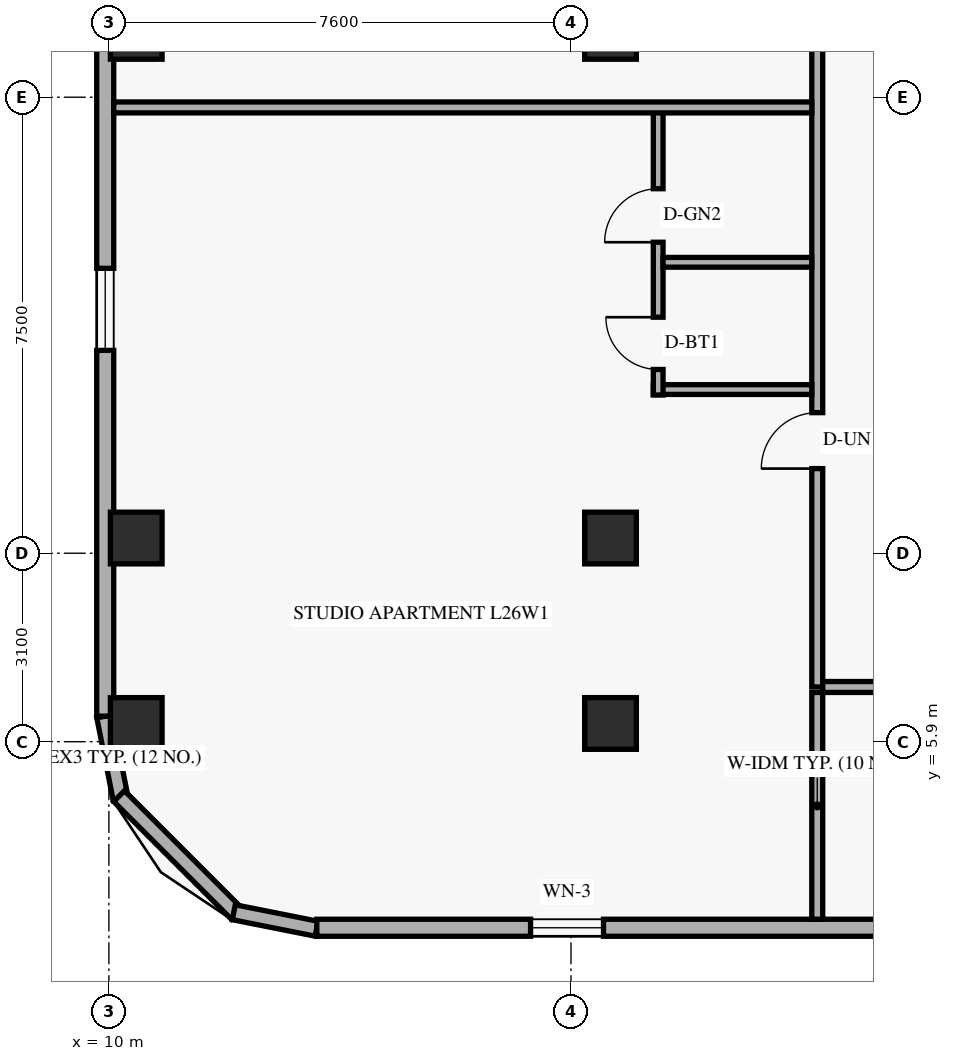
"""IFC4 building model, lengths in metres.
Left out: names, types, materials, properties, quantities, classifications, styles, units other than length and angle.
Written with IfcOpenShell. Run it as: python <this file> out.ifc"""

import sys

from ifc_helpers import new_model, si_unit, direction, frame, frame_2d, origin, origin_2d, place, context, subcontext, project, spatial, rectangle, extrude, element, fill, save


model = new_model("IFC4")
c1 = context("Model", 3, precision=1e-05, world=origin(), true_north=direction((0.0, 1.0)))
c2 = subcontext(c1, "Body", "Model", "MODEL_VIEW")
j1 = project(units=[si_unit("LENGTHUNIT", "METRE"), si_unit("PLANEANGLEUNIT", "RADIAN")], contexts=[c1])
p1 = place(None, origin())
s1 = spatial("IfcSite", under=j1, at=p1, CompositionType="ELEMENT")
p2 = place(p1, origin())
s2 = spatial("IfcBuilding", under=s1, at=p2, CompositionType="ELEMENT")
p3 = place(p2, frame((0.0, 0.0, 102.6)))
s3 = spatial("IfcBuildingStorey", under=s2, at=p3, CompositionType="ELEMENT", Elevation=102.6)
for number, where, z_axis, x_axis in (
    (1, (10.45, 6.2, 0.0), (0.0, 0.0, 1.0), (1.0, 0.0, 0.0)),
    (2, (10.45, 9.25, 0.0), (0.0, 0.0, 1.0), (1.0, 0.0, 0.0)),
    (3, (10.45, 17.55, 0.0), (0.0, 0.0, 1.0), (1.0, 0.0, 0.0)),
    (4, (18.25, 6.2, 0.0), (0.0, 0.0, 1.0), (1.0, 0.0, 0.0)),
    (5, (18.25, 9.25, 0.0), (0.0, 0.0, 1.0), (1.0, 0.0, 0.0)),
    (6, (18.25, 17.55, 0.0), (0.0, 0.0, 1.0), (1.0, 0.0, 0.0)),
):
    element("IfcColumn", number, at=place(p3, frame(where, z_axis=z_axis, x_axis=x_axis)), inside=s3, PredefinedType="COLUMN", context=c2, shape_type="SweptSolid", body=[
        extrude(rectangle(XDim=0.85, YDim=0.85, at=origin_2d()), origin(), (0.0, 0.0, 1.0), 3.6),
    ])
p4 = place(p3, frame((9.924, 6.316, 0.0), z_axis=(0.0, 0.0, 1.0), x_axis=(0.195000137217, -0.980803214965, 0.0)))
e7 = element("IfcWall", 7, at=p4, inside=s3, PredefinedType="SOLIDWALL", context=c2, shape_type="SweptSolid", body=[
    extrude(rectangle(XDim=1.388, YDim=0.25, at=frame_2d((0.694, 0.0))), origin(), (0.0, 0.0, 1.0), 3.36),
])
p5 = place(p3, frame((10.168, 5.005, 0.0), z_axis=(0.0, 0.0, 1.0), x_axis=(0.707151344399, -0.707062215165, 0.0)))
e8 = element("IfcWall", 8, at=p5, inside=s3, PredefinedType="SOLIDWALL", context=c2, shape_type="SweptSolid", body=[
    extrude(rectangle(XDim=2.739, YDim=0.25, at=frame_2d((1.37, 0.0))), origin(), (0.0, 0.0, 1.0), 3.36),
])
p6 = place(p3, frame((12.054, 3.095, 0.0), z_axis=(0.0, 0.0, 1.0), x_axis=(0.980809899341, -0.19496651342, 0.0)))
e9 = element("IfcWall", 9, at=p6, inside=s3, PredefinedType="SOLIDWALL", context=c2, shape_type="SweptSolid", body=[
    extrude(rectangle(XDim=1.389, YDim=0.25, at=frame_2d((0.694, 0.0))), origin(), (0.0, 0.0, 1.0), 3.36),
])
p7 = place(p3, frame((13.42, 2.84, 0.0), z_axis=(0.0, 0.0, 1.0), x_axis=(1.0, 0.0, 0.0)))
e10 = element("IfcWall", 10, at=p7, inside=s3, PredefinedType="SOLIDWALL", context=c2, shape_type="SweptSolid", body=[
    extrude(rectangle(XDim=36.56, YDim=0.28, at=frame_2d((18.28, 0.0))), origin(), (0.0, 0.0, 1.0), 3.36),
])
p8 = place(p7, frame((3.515, 0.0, 0.85)))
e11 = element("IfcOpeningElement", 11, at=p8, cuts=e10, PredefinedType="OPENING", context=c2, shape_type="SweptSolid", body=[
    extrude(rectangle(XDim=1.2, YDim=1.5, at=frame_2d((0.6, 0.75))), frame((0.0, 0.15, 0.0), z_axis=(0.0, -1.0, 0.0), x_axis=(1.0, 0.0, 0.0)), (0.0, 0.0, 1.0), 0.3),
])
p9 = place(p7, frame((10.005, 0.0, 0.85)))
e12 = element("IfcOpeningElement", 12, at=p9, cuts=e10, PredefinedType="OPENING", context=c2, shape_type="SweptSolid", body=[
    extrude(rectangle(XDim=1.2, YDim=1.5, at=frame_2d((0.6, 0.75))), frame((0.0, 0.15, 0.0), z_axis=(0.0, -1.0, 0.0), x_axis=(1.0, 0.0, 0.0)), (0.0, 0.0, 1.0), 0.3),
])
p10 = place(p7, frame((16.89, 0.0, 0.85)))
e13 = element("IfcOpeningElement", 13, at=p10, cuts=e10, PredefinedType="OPENING", context=c2, shape_type="SweptSolid", body=[
    extrude(rectangle(XDim=1.2, YDim=1.5, at=frame_2d((0.6, 0.75))), frame((0.0, 0.15, 0.0), z_axis=(0.0, -1.0, 0.0), x_axis=(1.0, 0.0, 0.0)), (0.0, 0.0, 1.0), 0.3),
])
p11 = place(p7, frame((24.495, 0.0, 0.85)))
e14 = element("IfcOpeningElement", 14, at=p11, cuts=e10, PredefinedType="OPENING", context=c2, shape_type="SweptSolid", body=[
    extrude(rectangle(XDim=1.2, YDim=1.5, at=frame_2d((0.6, 0.75))), frame((0.0, 0.15, 0.0), z_axis=(0.0, -1.0, 0.0), x_axis=(1.0, 0.0, 0.0)), (0.0, 0.0, 1.0), 0.3),
])
p12 = place(p7, frame((30.085, 0.0, 0.85)))
e15 = element("IfcOpeningElement", 15, at=p12, cuts=e10, PredefinedType="OPENING", context=c2, shape_type="SweptSolid", body=[
    extrude(rectangle(XDim=1.2, YDim=1.5, at=frame_2d((0.6, 0.75))), frame((0.0, 0.15, 0.0), z_axis=(0.0, -1.0, 0.0), x_axis=(1.0, 0.0, 0.0)), (0.0, 0.0, 1.0), 0.3),
])
p13 = place(p7, frame((34.27, 0.0, 0.85)))
e16 = element("IfcOpeningElement", 16, at=p13, cuts=e10, PredefinedType="OPENING", context=c2, shape_type="SweptSolid", body=[
    extrude(rectangle(XDim=1.2, YDim=1.5, at=frame_2d((0.6, 0.75))), frame((0.0, 0.15, 0.0), z_axis=(0.0, -1.0, 0.0), x_axis=(1.0, 0.0, 0.0)), (0.0, 0.0, 1.0), 0.3),
])
p14 = place(p3, frame((9.94, 41.68, 0.0), z_axis=(0.0, 0.0, 1.0), x_axis=(0.0, -1.0, 0.0)))
e17 = element("IfcWall", 17, at=p14, inside=s3, PredefinedType="SOLIDWALL", context=c2, shape_type="SweptSolid", body=[
    extrude(rectangle(XDim=35.36, YDim=0.28, at=frame_2d((17.68, 0.0))), origin(), (0.0, 0.0, 1.0), 3.36),
])
p15 = place(p14, frame((27.994, 0.0, 0.85)))
e18 = element("IfcOpeningElement", 18, at=p15, cuts=e17, PredefinedType="OPENING", context=c2, shape_type="SweptSolid", body=[
    extrude(rectangle(XDim=1.35, YDim=1.55, at=frame_2d((0.675, 0.775))), frame((0.0, 0.15, 0.0), z_axis=(0.0, -1.0, 0.0), x_axis=(1.0, 0.0, 0.0)), (0.0, 0.0, 1.0), 0.3),
])
p16 = place(p14, frame((22.018, 0.0, 0.85)))
e19 = element("IfcOpeningElement", 19, at=p16, cuts=e17, PredefinedType="OPENING", context=c2, shape_type="SweptSolid", body=[
    extrude(rectangle(XDim=1.35, YDim=1.55, at=frame_2d((0.675, 0.775))), frame((0.0, 0.15, 0.0), z_axis=(0.0, -1.0, 0.0), x_axis=(1.0, 0.0, 0.0)), (0.0, 0.0, 1.0), 0.3),
])
p17 = place(p14, frame((17.6, 0.0, 0.85)))
e20 = element("IfcOpeningElement", 20, at=p17, cuts=e17, PredefinedType="OPENING", context=c2, shape_type="SweptSolid", body=[
    extrude(rectangle(XDim=1.35, YDim=1.55, at=frame_2d((0.675, 0.775))), frame((0.0, 0.15, 0.0), z_axis=(0.0, -1.0, 0.0), x_axis=(1.0, 0.0, 0.0)), (0.0, 0.0, 1.0), 0.3),
])
p18 = place(p14, frame((12.712, 0.0, 0.85)))
e21 = element("IfcOpeningElement", 21, at=p18, cuts=e17, PredefinedType="OPENING", context=c2, shape_type="SweptSolid", body=[
    extrude(rectangle(XDim=1.35, YDim=1.55, at=frame_2d((0.675, 0.775))), frame((0.0, 0.15, 0.0), z_axis=(0.0, -1.0, 0.0), x_axis=(1.0, 0.0, 0.0)), (0.0, 0.0, 1.0), 0.3),
])
p19 = place(p14, frame((8.841, 0.0, 0.85)))
e22 = element("IfcOpeningElement", 22, at=p19, cuts=e17, PredefinedType="OPENING", context=c2, shape_type="SweptSolid", body=[
    extrude(rectangle(XDim=1.35, YDim=1.55, at=frame_2d((0.675, 0.775))), frame((0.0, 0.15, 0.0), z_axis=(0.0, -1.0, 0.0), x_axis=(1.0, 0.0, 0.0)), (0.0, 0.0, 1.0), 0.3),
])
p20 = place(p14, frame((5.094, 0.0, 0.85)))
e23 = element("IfcOpeningElement", 23, at=p20, cuts=e17, PredefinedType="OPENING", context=c2, shape_type="SweptSolid", body=[
    extrude(rectangle(XDim=1.35, YDim=1.55, at=frame_2d((0.675, 0.775))), frame((0.0, 0.15, 0.0), z_axis=(0.0, -1.0, 0.0), x_axis=(1.0, 0.0, 0.0)), (0.0, 0.0, 1.0), 0.3),
])
p21 = place(p3, frame((21.65, 6.8, 0.0), z_axis=(0.0, 0.0, 1.0), x_axis=(0.0, 1.0, 0.0)))
e24 = element("IfcWall", 24, at=p21, inside=s3, PredefinedType="STANDARD", context=c2, shape_type="SweptSolid", body=[
    extrude(rectangle(XDim=34.4, YDim=0.18, at=frame_2d((17.2, 0.0))), origin(), (0.0, 0.0, 1.0), 2.731),
])
p22 = place(p21, frame((3.592, 0.0, 0.0)))
e25 = element("IfcOpeningElement", 25, at=p22, cuts=e24, PredefinedType="OPENING", context=c2, shape_type="SweptSolid", body=[
    extrude(rectangle(XDim=0.92, YDim=2.15, at=frame_2d((0.46, 1.075))), frame((0.0, 0.1, 0.0), z_axis=(0.0, -1.0, 0.0), x_axis=(1.0, 0.0, 0.0)), (0.0, 0.0, 1.0), 0.2),
])
p23 = place(p21, frame((14.019, 0.0, 0.0)))
e26 = element("IfcOpeningElement", 26, at=p23, cuts=e24, PredefinedType="OPENING", context=c2, shape_type="SweptSolid", body=[
    extrude(rectangle(XDim=0.92, YDim=2.15, at=frame_2d((0.46, 1.075))), frame((0.0, 0.1, 0.0), z_axis=(0.0, -1.0, 0.0), x_axis=(1.0, 0.0, 0.0)), (0.0, 0.0, 1.0), 0.2),
])
p24 = place(p21, frame((28.675, 0.0, 0.0)))
e27 = element("IfcOpeningElement", 27, at=p24, cuts=e24, PredefinedType="OPENING", context=c2, shape_type="SweptSolid", body=[
    extrude(rectangle(XDim=0.92, YDim=2.15, at=frame_2d((0.46, 1.075))), frame((0.0, 0.1, 0.0), z_axis=(0.0, -1.0, 0.0), x_axis=(1.0, 0.0, 0.0)), (0.0, 0.0, 1.0), 0.2),
])
p25 = place(p3, frame((21.74, 6.8, 0.0), z_axis=(0.0, 0.0, 1.0), x_axis=(1.0, 0.0, 0.0)))
e28 = element("IfcWall", 28, at=p25, inside=s3, PredefinedType="STANDARD", context=c2, shape_type="SweptSolid", body=[
    extrude(rectangle(XDim=13.68, YDim=0.18, at=frame_2d((6.84, 0.0))), origin(), (0.0, 0.0, 1.0), 2.731),
])
p26 = place(p25, frame((0.97, 0.0, 0.0)))
e29 = element("IfcOpeningElement", 29, at=p26, cuts=e28, PredefinedType="OPENING", context=c2, shape_type="SweptSolid", body=[
    extrude(rectangle(XDim=0.95, YDim=2.15, at=frame_2d((0.475, 1.075))), frame((0.0, 0.1, 0.0), z_axis=(0.0, -1.0, 0.0), x_axis=(1.0, 0.0, 0.0)), (0.0, 0.0, 1.0), 0.2),
])
p27 = place(p25, frame((9.11, 0.0, 0.0)))
e30 = element("IfcOpeningElement", 30, at=p27, cuts=e28, PredefinedType="OPENING", context=c2, shape_type="SweptSolid", body=[
    extrude(rectangle(XDim=0.95, YDim=2.15, at=frame_2d((0.475, 1.075))), frame((0.0, 0.1, 0.0), z_axis=(0.0, -1.0, 0.0), x_axis=(1.0, 0.0, 0.0)), (0.0, 0.0, 1.0), 0.2),
])
p28 = place(p3, frame((21.65, 2.98, 0.0), z_axis=(0.0, 0.0, 1.0), x_axis=(0.0, 1.0, 0.0)))
e31 = element("IfcWall", 31, at=p28, inside=s3, PredefinedType="PARTITIONING", context=c2, shape_type="SweptSolid", body=[
    extrude(rectangle(XDim=3.73, YDim=0.18, at=frame_2d((1.865, 0.0))), origin(), (0.0, 0.0, 1.0), 2.809),
])
p29 = place(p3, frame((18.954, 11.692, 0.0), z_axis=(0.0, 0.0, 1.0), x_axis=(1.0, 0.0, 0.0)))
e32 = element("IfcWall", 32, at=p29, inside=s3, PredefinedType="PLUMBINGWALL", context=c2, shape_type="SweptSolid", body=[
    extrude(rectangle(XDim=2.606, YDim=0.16, at=frame_2d((1.303, 0.0))), origin(), (0.0, 0.0, 1.0), 3.36),
])
p30 = place(p3, frame((19.034, 11.602, 0.0), z_axis=(0.0, 0.0, 1.0), x_axis=(0.0, 1.0, 0.0)))
e33 = element("IfcWall", 33, at=p30, inside=s3, PredefinedType="PLUMBINGWALL", context=c2, shape_type="SweptSolid", body=[
    extrude(rectangle(XDim=4.73, YDim=0.16, at=frame_2d((2.365, 0.0))), origin(), (0.0, 0.0, 1.0), 2.988),
])
p31 = place(p30, frame((0.42, 0.0, 0.0)))
e34 = element("IfcOpeningElement", 34, at=p31, cuts=e33, PredefinedType="OPENING", context=c2, shape_type="SweptSolid", body=[
    extrude(rectangle(XDim=0.86, YDim=2.12, at=frame_2d((0.43, 1.06))), frame((0.0, 0.09, 0.0), z_axis=(0.0, -1.0, 0.0), x_axis=(1.0, 0.0, 0.0)), (0.0, 0.0, 1.0), 0.18),
])
p32 = place(p30, frame((2.513, 0.0, 0.0)))
e35 = element("IfcOpeningElement", 35, at=p32, cuts=e33, PredefinedType="OPENING", context=c2, shape_type="SweptSolid", body=[
    extrude(rectangle(XDim=0.88, YDim=2.12, at=frame_2d((0.44, 1.06))), frame((0.0, 0.09, 0.0), z_axis=(0.0, -1.0, 0.0), x_axis=(1.0, 0.0, 0.0)), (0.0, 0.0, 1.0), 0.18),
])
p33 = place(p3, frame((19.114, 13.785, 0.0), z_axis=(0.0, 0.0, 1.0), x_axis=(1.0, 0.0, 0.0)))
e36 = element("IfcWall", 36, at=p33, inside=s3, PredefinedType="PLUMBINGWALL", context=c2, shape_type="SweptSolid", body=[
    extrude(rectangle(XDim=2.446, YDim=0.16, at=frame_2d((1.223, 0.0))), origin(), (0.0, 0.0, 1.0), 2.988),
])
p34 = place(p3, frame((10.08, 16.332, 0.0), z_axis=(0.0, 0.0, 1.0), x_axis=(1.0, 0.0, 0.0)))
e37 = element("IfcWall", 37, at=p34, inside=s3, PredefinedType="PARTITIONING", context=c2, shape_type="SweptSolid", body=[
    extrude(rectangle(XDim=11.48, YDim=0.18, at=frame_2d((5.74, 0.0))), origin(), (0.0, 0.0, 1.0), 2.731),
])
p35 = place(p8, origin())
e38 = element("IfcWindow", 38, at=p35, inside=s3, PartitioningType="SINGLE_PANEL", PredefinedType="WINDOW", context=c2, shape_type="SweptSolid", body=[
    extrude(rectangle(XDim=1.2, YDim=1.5, at=frame_2d((0.6, 0.75))), frame((0.0, 0.03, 0.0), z_axis=(0.0, -1.0, 0.0), x_axis=(1.0, 0.0, 0.0)), (0.0, 0.0, 1.0), 0.06),
])
fill(e11, e38)
p36 = place(p15, origin())
e39 = element("IfcWindow", 39, at=p36, inside=s3, PartitioningType="SINGLE_PANEL", PredefinedType="WINDOW", context=c2, shape_type="SweptSolid", body=[
    extrude(rectangle(XDim=1.35, YDim=1.55, at=frame_2d((0.675, 0.775))), frame((0.0, 0.03, 0.0), z_axis=(0.0, -1.0, 0.0), x_axis=(1.0, 0.0, 0.0)), (0.0, 0.0, 1.0), 0.06),
])
fill(e18, e39)
p37 = place(p22, origin())
e40 = element("IfcDoor", 40, at=p37, inside=s3, OperationType="SINGLE_SWING_LEFT", PredefinedType="DOOR", context=c2, shape_type="SweptSolid", body=[
    extrude(rectangle(XDim=0.92, YDim=2.15, at=frame_2d((0.46, 1.075))), frame((0.0, 0.025, 0.0), z_axis=(0.0, -1.0, 0.0), x_axis=(1.0, 0.0, 0.0)), (0.0, 0.0, 1.0), 0.05),
])
fill(e25, e40)
p38 = place(p31, origin())
e41 = element("IfcDoor", 41, at=p38, inside=s3, OperationType="SINGLE_SWING_RIGHT", PredefinedType="DOOR", context=c2, shape_type="SweptSolid", body=[
    extrude(rectangle(XDim=0.86, YDim=2.12, at=frame_2d((0.43, 1.06))), frame((0.0, 0.025, 0.0), z_axis=(0.0, -1.0, 0.0), x_axis=(1.0, 0.0, 0.0)), (0.0, 0.0, 1.0), 0.05),
])
fill(e34, e41)
p39 = place(p32, origin())
e42 = element("IfcDoor", 42, at=p39, inside=s3, OperationType="SINGLE_SWING_LEFT", PredefinedType="DOOR", context=c2, shape_type="SweptSolid", body=[
    extrude(rectangle(XDim=0.88, YDim=2.12, at=frame_2d((0.44, 1.06))), frame((0.0, 0.025, 0.0), z_axis=(0.0, -1.0, 0.0), x_axis=(1.0, 0.0, 0.0)), (0.0, 0.0, 1.0), 0.05),
])
fill(e35, e42)
save(model, sys.argv[1])
